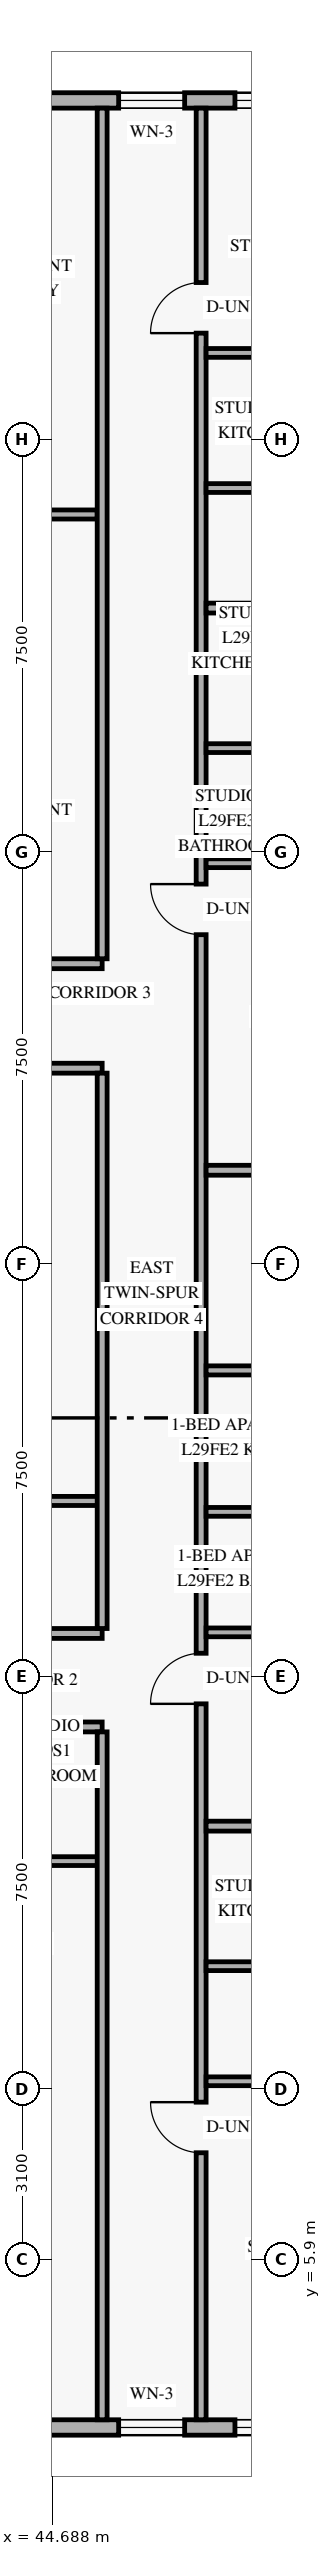
"""IFC4 building model, lengths in metres.
Left out: names, types, materials, properties, quantities, classifications, styles, units other than length and angle.
Written with IfcOpenShell. Run it as: python <this file> out.ifc"""

import sys

from ifc_helpers import new_model, si_unit, direction, frame, frame_2d, origin, place, context, subcontext, project, spatial, rectangle, extrude, element, fill, save


model = new_model("IFC4")
c1 = context("Model", 3, precision=1e-05, world=origin(), true_north=direction((0.0, 1.0)))
c2 = subcontext(c1, "Body", "Model", "MODEL_VIEW")
j1 = project(units=[si_unit("LENGTHUNIT", "METRE"), si_unit("PLANEANGLEUNIT", "RADIAN")], contexts=[c1])
p1 = place(None, origin())
s1 = spatial("IfcSite", under=j1, at=p1, CompositionType="ELEMENT")
p2 = place(p1, origin())
s2 = spatial("IfcBuilding", under=s1, at=p2, CompositionType="ELEMENT")
p3 = place(p2, frame((0.0, 0.0, 113.4)))
s3 = spatial("IfcBuildingStorey", under=s2, at=p3, CompositionType="ELEMENT", Elevation=113.4)
p4 = place(p3, frame((13.42, 2.84, 0.0), z_axis=(0.0, 0.0, 1.0), x_axis=(1.0, 0.0, 0.0)))
e1 = element("IfcWall", 1, at=p4, inside=s3, PredefinedType="SOLIDWALL", context=c2, shape_type="SweptSolid", body=[
    extrude(rectangle(XDim=36.56, YDim=0.28, at=frame_2d((18.28, 0.0))), origin(), (0.0, 0.0, 1.0), 3.35),
])
p5 = place(p4, frame((3.44, 0.0, 0.85)))
e2 = element("IfcOpeningElement", 2, at=p5, cuts=e1, PredefinedType="OPENING", context=c2, shape_type="SweptSolid", body=[
    extrude(rectangle(XDim=1.35, YDim=1.55, at=frame_2d((0.675, 0.775))), frame((0.0, 0.15, 0.0), z_axis=(0.0, -1.0, 0.0), x_axis=(1.0, 0.0, 0.0)), (0.0, 0.0, 1.0), 0.3),
])
p6 = place(p4, frame((10.28, 0.0, 0.85)))
e3 = element("IfcOpeningElement", 3, at=p6, cuts=e1, PredefinedType="OPENING", context=c2, shape_type="SweptSolid", body=[
    extrude(rectangle(XDim=1.35, YDim=1.55, at=frame_2d((0.675, 0.775))), frame((0.0, 0.15, 0.0), z_axis=(0.0, -1.0, 0.0), x_axis=(1.0, 0.0, 0.0)), (0.0, 0.0, 1.0), 0.3),
])
p7 = place(p4, frame((17.165, 0.0, 0.85)))
e4 = element("IfcOpeningElement", 4, at=p7, cuts=e1, PredefinedType="OPENING", context=c2, shape_type="SweptSolid", body=[
    extrude(rectangle(XDim=1.35, YDim=1.55, at=frame_2d((0.675, 0.775))), frame((0.0, 0.15, 0.0), z_axis=(0.0, -1.0, 0.0), x_axis=(1.0, 0.0, 0.0)), (0.0, 0.0, 1.0), 0.3),
])
p8 = place(p4, frame((22.59, 0.0, 0.85)))
e5 = element("IfcOpeningElement", 5, at=p8, cuts=e1, PredefinedType="OPENING", context=c2, shape_type="SweptSolid", body=[
    extrude(rectangle(XDim=1.35, YDim=1.55, at=frame_2d((0.675, 0.775))), frame((0.0, 0.15, 0.0), z_axis=(0.0, -1.0, 0.0), x_axis=(1.0, 0.0, 0.0)), (0.0, 0.0, 1.0), 0.3),
])
p9 = place(p4, frame((27.68, 0.0, 0.85)))
e6 = element("IfcOpeningElement", 6, at=p9, cuts=e1, PredefinedType="OPENING", context=c2, shape_type="SweptSolid", body=[
    extrude(rectangle(XDim=1.35, YDim=1.55, at=frame_2d((0.675, 0.775))), frame((0.0, 0.15, 0.0), z_axis=(0.0, -1.0, 0.0), x_axis=(1.0, 0.0, 0.0)), (0.0, 0.0, 1.0), 0.3),
])
p10 = place(p4, frame((32.48, 0.0, 0.85)))
e7 = element("IfcOpeningElement", 7, at=p10, cuts=e1, PredefinedType="OPENING", context=c2, shape_type="SweptSolid", body=[
    extrude(rectangle(XDim=1.2, YDim=1.5, at=frame_2d((0.6, 0.75))), frame((0.0, 0.15, 0.0), z_axis=(0.0, -1.0, 0.0), x_axis=(1.0, 0.0, 0.0)), (0.0, 0.0, 1.0), 0.3),
])
p11 = place(p4, frame((34.595, 0.0, 0.85)))
e8 = element("IfcOpeningElement", 8, at=p11, cuts=e1, PredefinedType="OPENING", context=c2, shape_type="SweptSolid", body=[
    extrude(rectangle(XDim=1.35, YDim=1.55, at=frame_2d((0.675, 0.775))), frame((0.0, 0.15, 0.0), z_axis=(0.0, -1.0, 0.0), x_axis=(1.0, 0.0, 0.0)), (0.0, 0.0, 1.0), 0.3),
])
p12 = place(p3, frame((49.98, 45.16, 0.0), z_axis=(0.0, 0.0, 1.0), x_axis=(-1.0, 0.0, 0.0)))
e9 = element("IfcWall", 9, at=p12, inside=s3, PredefinedType="SOLIDWALL", context=c2, shape_type="SweptSolid", body=[
    extrude(rectangle(XDim=36.56, YDim=0.28, at=frame_2d((18.28, 0.0))), origin(), (0.0, 0.0, 1.0), 3.35),
])
p13 = place(p12, frame((31.77, 0.0, 0.85)))
e10 = element("IfcOpeningElement", 10, at=p13, cuts=e9, PredefinedType="OPENING", context=c2, shape_type="SweptSolid", body=[
    extrude(rectangle(XDim=1.35, YDim=1.55, at=frame_2d((0.675, 0.775))), frame((0.0, 0.15, 0.0), z_axis=(0.0, -1.0, 0.0), x_axis=(1.0, 0.0, 0.0)), (0.0, 0.0, 1.0), 0.3),
])
p14 = place(p12, frame((23.28, 0.0, 0.85)))
e11 = element("IfcOpeningElement", 11, at=p14, cuts=e9, PredefinedType="OPENING", context=c2, shape_type="SweptSolid", body=[
    extrude(rectangle(XDim=1.35, YDim=1.55, at=frame_2d((0.675, 0.775))), frame((0.0, 0.15, 0.0), z_axis=(0.0, -1.0, 0.0), x_axis=(1.0, 0.0, 0.0)), (0.0, 0.0, 1.0), 0.3),
])
p15 = place(p12, frame((16.395, 0.0, 0.85)))
e12 = element("IfcOpeningElement", 12, at=p15, cuts=e9, PredefinedType="OPENING", context=c2, shape_type="SweptSolid", body=[
    extrude(rectangle(XDim=1.35, YDim=1.55, at=frame_2d((0.675, 0.775))), frame((0.0, 0.15, 0.0), z_axis=(0.0, -1.0, 0.0), x_axis=(1.0, 0.0, 0.0)), (0.0, 0.0, 1.0), 0.3),
])
p16 = place(p12, frame((10.79, 0.0, 0.85)))
e13 = element("IfcOpeningElement", 13, at=p16, cuts=e9, PredefinedType="OPENING", context=c2, shape_type="SweptSolid", body=[
    extrude(rectangle(XDim=1.35, YDim=1.55, at=frame_2d((0.675, 0.775))), frame((0.0, 0.15, 0.0), z_axis=(0.0, -1.0, 0.0), x_axis=(1.0, 0.0, 0.0)), (0.0, 0.0, 1.0), 0.3),
])
p17 = place(p12, frame((5.7, 0.0, 0.85)))
e14 = element("IfcOpeningElement", 14, at=p17, cuts=e9, PredefinedType="OPENING", context=c2, shape_type="SweptSolid", body=[
    extrude(rectangle(XDim=1.35, YDim=1.55, at=frame_2d((0.675, 0.775))), frame((0.0, 0.15, 0.0), z_axis=(0.0, -1.0, 0.0), x_axis=(1.0, 0.0, 0.0)), (0.0, 0.0, 1.0), 0.3),
])
p18 = place(p12, frame((2.88, 0.0, 0.85)))
e15 = element("IfcOpeningElement", 15, at=p18, cuts=e9, PredefinedType="OPENING", context=c2, shape_type="SweptSolid", body=[
    extrude(rectangle(XDim=1.2, YDim=1.5, at=frame_2d((0.6, 0.75))), frame((0.0, 0.15, 0.0), z_axis=(0.0, -1.0, 0.0), x_axis=(1.0, 0.0, 0.0)), (0.0, 0.0, 1.0), 0.3),
])
p19 = place(p12, frame((0.615, 0.0, 0.85)))
e16 = element("IfcOpeningElement", 16, at=p19, cuts=e9, PredefinedType="OPENING", context=c2, shape_type="SweptSolid", body=[
    extrude(rectangle(XDim=1.35, YDim=1.55, at=frame_2d((0.675, 0.775))), frame((0.0, 0.15, 0.0), z_axis=(0.0, -1.0, 0.0), x_axis=(1.0, 0.0, 0.0)), (0.0, 0.0, 1.0), 0.3),
])
p20 = place(p3, frame((38.032, 15.58, 0.0), z_axis=(0.0, 0.0, 1.0), x_axis=(1.0, 0.0, 0.0)))
e17 = element("IfcWall", 17, at=p20, inside=s3, PredefinedType="STANDARD", context=c2, shape_type="SweptSolid", body=[
    extrude(rectangle(XDim=7.568, YDim=0.18, at=frame_2d((3.784, 0.0))), origin(), (0.0, 0.0, 1.0), 2.721),
])
p21 = place(p20, frame((0.357, 0.0, 0.0)))
e18 = element("IfcOpeningElement", 18, at=p21, cuts=e17, PredefinedType="OPENING", context=c2, shape_type="SweptSolid", body=[
    extrude(rectangle(XDim=0.92, YDim=2.15, at=frame_2d((0.46, 1.075))), frame((0.0, 0.1, 0.0), z_axis=(0.0, -1.0, 0.0), x_axis=(1.0, 0.0, 0.0)), (0.0, 0.0, 1.0), 0.2),
])
p22 = place(p3, frame((37.64, 17.28, 0.0), z_axis=(0.0, 0.0, 1.0), x_axis=(1.0, 0.0, 0.0)))
e19 = element("IfcWall", 19, at=p22, inside=s3, PredefinedType="STANDARD", context=c2, shape_type="SweptSolid", body=[
    extrude(rectangle(XDim=7.96, YDim=0.18, at=frame_2d((3.98, 0.0))), origin(), (0.0, 0.0, 1.0), 2.721),
])
p23 = place(p22, frame((1.31, 0.0, 0.0)))
e20 = element("IfcOpeningElement", 20, at=p23, cuts=e19, PredefinedType="OPENING", context=c2, shape_type="SweptSolid", body=[
    extrude(rectangle(XDim=0.95, YDim=2.15, at=frame_2d((0.475, 1.075))), frame((0.0, 0.1, 0.0), z_axis=(0.0, -1.0, 0.0), x_axis=(1.0, 0.0, 0.0)), (0.0, 0.0, 1.0), 0.2),
])
p24 = place(p3, frame((41.18, 27.56, 0.0), z_axis=(0.0, 0.0, 1.0), x_axis=(1.0, 0.0, 0.0)))
e21 = element("IfcWall", 21, at=p24, inside=s3, PredefinedType="STANDARD", context=c2, shape_type="SweptSolid", body=[
    extrude(rectangle(XDim=4.42, YDim=0.18, at=frame_2d((2.21, 0.0))), origin(), (0.0, 0.0, 1.0), 2.721),
])
p25 = place(p24, frame((0.45, 0.0, 0.0)))
e22 = element("IfcOpeningElement", 22, at=p25, cuts=e21, PredefinedType="OPENING", context=c2, shape_type="SweptSolid", body=[
    extrude(rectangle(XDim=0.88, YDim=2.12, at=frame_2d((0.44, 1.06))), frame((0.0, 0.1, 0.0), z_axis=(0.0, -1.0, 0.0), x_axis=(1.0, 0.0, 0.0)), (0.0, 0.0, 1.0), 0.2),
])
p26 = place(p3, frame((35.51, 29.46, 0.0), z_axis=(0.0, 0.0, 1.0), x_axis=(1.0, 0.0, 0.0)))
e23 = element("IfcWall", 23, at=p26, inside=s3, PredefinedType="STANDARD", context=c2, shape_type="SweptSolid", body=[
    extrude(rectangle(XDim=10.09, YDim=0.18, at=frame_2d((5.045, 0.0))), origin(), (0.0, 0.0, 1.0), 2.721),
])
p27 = place(p26, frame((0.32, 0.0, 0.0)))
e24 = element("IfcOpeningElement", 24, at=p27, cuts=e23, PredefinedType="OPENING", context=c2, shape_type="SweptSolid", body=[
    extrude(rectangle(XDim=0.92, YDim=2.15, at=frame_2d((0.46, 1.075))), frame((0.0, 0.1, 0.0), z_axis=(0.0, -1.0, 0.0), x_axis=(1.0, 0.0, 0.0)), (0.0, 0.0, 1.0), 0.2),
])
p28 = place(p3, frame((40.93, 13.14, 0.0), z_axis=(0.0, 0.0, 1.0), x_axis=(1.0, 0.0, 0.0)))
e25 = element("IfcWall", 25, at=p28, inside=s3, PredefinedType="PLUMBINGWALL", context=c2, shape_type="SweptSolid", body=[
    extrude(rectangle(XDim=4.67, YDim=0.16, at=frame_2d((2.335, 0.0))), origin(), (0.0, 0.0, 1.0), 2.721),
])
p29 = place(p28, frame((0.35, 0.0, 0.0)))
e26 = element("IfcOpeningElement", 26, at=p29, cuts=e25, PredefinedType="OPENING", context=c2, shape_type="SweptSolid", body=[
    extrude(rectangle(XDim=0.88, YDim=2.12, at=frame_2d((0.44, 1.06))), frame((0.0, 0.09, 0.0), z_axis=(0.0, -1.0, 0.0), x_axis=(1.0, 0.0, 0.0)), (0.0, 0.0, 1.0), 0.18),
])
p30 = place(p28, frame((2.72, 0.0, 0.0)))
e27 = element("IfcOpeningElement", 27, at=p30, cuts=e25, PredefinedType="OPENING", context=c2, shape_type="SweptSolid", body=[
    extrude(rectangle(XDim=0.86, YDim=2.12, at=frame_2d((0.43, 1.06))), frame((0.0, 0.09, 0.0), z_axis=(0.0, -1.0, 0.0), x_axis=(1.0, 0.0, 0.0)), (0.0, 0.0, 1.0), 0.18),
])
p31 = place(p3, frame((41.69, 37.63, 0.0), z_axis=(0.0, 0.0, 1.0), x_axis=(1.0, 0.0, 0.0)))
e28 = element("IfcWall", 28, at=p31, inside=s3, PredefinedType="PARTITIONING", context=c2, shape_type="SweptSolid", body=[
    extrude(rectangle(XDim=3.82, YDim=0.165, at=frame_2d((1.91, 0.0))), origin(), (0.0, 0.0, 1.0), 2.721),
])
p32 = place(p3, frame((41.18, 19.69, 0.0), z_axis=(0.0, 0.0, 1.0), x_axis=(1.0, 0.0, 0.0)))
e29 = element("IfcWall", 29, at=p32, inside=s3, PredefinedType="PARTITIONING", context=c2, shape_type="SweptSolid", body=[
    extrude(rectangle(XDim=4.42, YDim=0.165, at=frame_2d((2.21, 0.0))), origin(), (0.0, 0.0, 1.0), 2.721),
])
p33 = place(p3, frame((47.4, 2.98, 0.0), z_axis=(0.0, 0.0, 1.0), x_axis=(0.0, 1.0, 0.0)))
e30 = element("IfcWall", 30, at=p33, inside=s3, PredefinedType="STANDARD", context=c2, shape_type="SweptSolid", body=[
    extrude(rectangle(XDim=42.04, YDim=0.18, at=frame_2d((21.02, 0.0))), origin(), (0.0, 0.0, 1.0), 2.721),
])
p34 = place(p33, frame((4.856, 0.0, 0.0)))
e31 = element("IfcOpeningElement", 31, at=p34, cuts=e30, PredefinedType="OPENING", context=c2, shape_type="SweptSolid", body=[
    extrude(rectangle(XDim=0.92, YDim=2.15, at=frame_2d((0.46, 1.075))), frame((0.0, 0.1, 0.0), z_axis=(0.0, -1.0, 0.0), x_axis=(1.0, 0.0, 0.0)), (0.0, 0.0, 1.0), 0.2),
])
p35 = place(p33, frame((13.02, 0.0, 0.0)))
e32 = element("IfcOpeningElement", 32, at=p35, cuts=e30, PredefinedType="OPENING", context=c2, shape_type="SweptSolid", body=[
    extrude(rectangle(XDim=0.92, YDim=2.15, at=frame_2d((0.46, 1.075))), frame((0.0, 0.1, 0.0), z_axis=(0.0, -1.0, 0.0), x_axis=(1.0, 0.0, 0.0)), (0.0, 0.0, 1.0), 0.2),
])
p36 = place(p33, frame((27.008, 0.0, 0.0)))
e33 = element("IfcOpeningElement", 33, at=p36, cuts=e30, PredefinedType="OPENING", context=c2, shape_type="SweptSolid", body=[
    extrude(rectangle(XDim=0.92, YDim=2.15, at=frame_2d((0.46, 1.075))), frame((0.0, 0.1, 0.0), z_axis=(0.0, -1.0, 0.0), x_axis=(1.0, 0.0, 0.0)), (0.0, 0.0, 1.0), 0.2),
])
p37 = place(p33, frame((37.948, 0.0, 0.0)))
e34 = element("IfcOpeningElement", 34, at=p37, cuts=e30, PredefinedType="OPENING", context=c2, shape_type="SweptSolid", body=[
    extrude(rectangle(XDim=0.92, YDim=2.15, at=frame_2d((0.46, 1.075))), frame((0.0, 0.1, 0.0), z_axis=(0.0, -1.0, 0.0), x_axis=(1.0, 0.0, 0.0)), (0.0, 0.0, 1.0), 0.2),
])
p38 = place(p3, frame((45.6, 2.98, 0.0), z_axis=(0.0, 0.0, 1.0), x_axis=(0.0, 1.0, 0.0)))
e35 = element("IfcWall", 35, at=p38, inside=s3, PredefinedType="STANDARD", context=c2, shape_type="SweptSolid", body=[
    extrude(rectangle(XDim=12.51, YDim=0.18, at=frame_2d((6.255, 0.0))), origin(), (0.0, 0.0, 1.0), 2.721),
])
p39 = place(p3, frame((45.6, 17.37, 0.0), z_axis=(0.0, 0.0, 1.0), x_axis=(0.0, 1.0, 0.0)))
e36 = element("IfcWall", 36, at=p39, inside=s3, PredefinedType="STANDARD", context=c2, shape_type="SweptSolid", body=[
    extrude(rectangle(XDim=10.1, YDim=0.18, at=frame_2d((5.05, 0.0))), origin(), (0.0, 0.0, 1.0), 2.721),
])
p40 = place(p3, frame((45.6, 29.55, 0.0), z_axis=(0.0, 0.0, 1.0), x_axis=(0.0, 1.0, 0.0)))
e37 = element("IfcWall", 37, at=p40, inside=s3, PredefinedType="STANDARD", context=c2, shape_type="SweptSolid", body=[
    extrude(rectangle(XDim=15.47, YDim=0.18, at=frame_2d((7.735, 0.0))), origin(), (0.0, 0.0, 1.0), 2.721),
])
p41 = place(p3, frame((47.49, 9.136, 0.0), z_axis=(0.0, 0.0, 1.0), x_axis=(1.0, 0.0, 0.0)))
e38 = element("IfcWall", 38, at=p41, inside=s3, PredefinedType="PLUMBINGWALL", context=c2, shape_type="SweptSolid", body=[
    extrude(rectangle(XDim=3.775, YDim=0.16, at=frame_2d((1.888, 0.0))), origin(), (0.0, 0.0, 1.0), 2.721),
])
p42 = place(p3, frame((47.49, 11.229, 0.0), z_axis=(0.0, 0.0, 1.0), x_axis=(1.0, 0.0, 0.0)))
e39 = element("IfcWall", 39, at=p42, inside=s3, PredefinedType="PLUMBINGWALL", context=c2, shape_type="SweptSolid", body=[
    extrude(rectangle(XDim=3.615, YDim=0.16, at=frame_2d((1.808, 0.0))), origin(), (0.0, 0.0, 1.0), 2.799),
])
p43 = place(p3, frame((47.49, 13.776, 0.0), z_axis=(0.0, 0.0, 1.0), x_axis=(1.0, 0.0, 0.0)))
e40 = element("IfcWall", 40, at=p43, inside=s3, PredefinedType="PARTITIONING", context=c2, shape_type="SweptSolid", body=[
    extrude(rectangle(XDim=5.83, YDim=0.18, at=frame_2d((2.915, 0.0))), origin(), (0.0, 0.0, 1.0), 2.799),
])
p44 = place(p3, frame((47.49, 22.064, 0.0), z_axis=(0.0, 0.0, 1.0), x_axis=(1.0, 0.0, 0.0)))
e41 = element("IfcWall", 41, at=p44, inside=s3, PredefinedType="PARTITIONING", context=c2, shape_type="SweptSolid", body=[
    extrude(rectangle(XDim=5.83, YDim=0.165, at=frame_2d((2.915, 0.0))), origin(), (0.0, 0.0, 1.0), 2.799),
])
p45 = place(p44, frame((4.468, 0.0, 0.0)))
e42 = element("IfcOpeningElement", 42, at=p45, cuts=e41, PredefinedType="OPENING", context=c2, shape_type="SweptSolid", body=[
    extrude(rectangle(XDim=0.9, YDim=2.14, at=frame_2d((0.45, 1.07))), frame((0.0, 0.093, 0.0), z_axis=(0.0, -1.0, 0.0), x_axis=(1.0, 0.0, 0.0)), (0.0, 0.0, 1.0), 0.185),
])
p46 = place(p3, frame((47.49, 17.3, 0.0), z_axis=(0.0, 0.0, 1.0), x_axis=(1.0, 0.0, 0.0)))
e43 = element("IfcWall", 43, at=p46, inside=s3, PredefinedType="PLUMBINGWALL", context=c2, shape_type="SweptSolid", body=[
    extrude(rectangle(XDim=3.775, YDim=0.16, at=frame_2d((1.888, 0.0))), origin(), (0.0, 0.0, 1.0), 2.721),
])
p47 = place(p3, frame((47.49, 19.491, 0.0), z_axis=(0.0, 0.0, 1.0), x_axis=(1.0, 0.0, 0.0)))
e44 = element("IfcWall", 44, at=p47, inside=s3, PredefinedType="PLUMBINGWALL", context=c2, shape_type="SweptSolid", body=[
    extrude(rectangle(XDim=3.615, YDim=0.16, at=frame_2d((1.808, 0.0))), origin(), (0.0, 0.0, 1.0), 2.799),
])
p48 = place(p3, frame((47.49, 25.704, 0.0), z_axis=(0.0, 0.0, 1.0), x_axis=(1.0, 0.0, 0.0)))
e45 = element("IfcWall", 45, at=p48, inside=s3, PredefinedType="PARTITIONING", context=c2, shape_type="SweptSolid", body=[
    extrude(rectangle(XDim=5.83, YDim=0.18, at=frame_2d((2.915, 0.0))), origin(), (0.0, 0.0, 1.0), 2.799),
])
p49 = place(p3, frame((47.49, 31.288, 0.0), z_axis=(0.0, 0.0, 1.0), x_axis=(1.0, 0.0, 0.0)))
e46 = element("IfcWall", 46, at=p49, inside=s3, PredefinedType="PLUMBINGWALL", context=c2, shape_type="SweptSolid", body=[
    extrude(rectangle(XDim=2.53, YDim=0.16, at=frame_2d((1.265, 0.0))), origin(), (0.0, 0.0, 1.0), 2.799),
])
p50 = place(p3, frame((47.49, 33.381, 0.0), z_axis=(0.0, 0.0, 1.0), x_axis=(1.0, 0.0, 0.0)))
e47 = element("IfcWall", 47, at=p50, inside=s3, PredefinedType="PLUMBINGWALL", context=c2, shape_type="SweptSolid", body=[
    extrude(rectangle(XDim=2.37, YDim=0.16, at=frame_2d((1.185, 0.0))), origin(), (0.0, 0.0, 1.0), 2.799),
])
p51 = place(p3, frame((47.49, 35.928, 0.0), z_axis=(0.0, 0.0, 1.0), x_axis=(1.0, 0.0, 0.0)))
e48 = element("IfcWall", 48, at=p51, inside=s3, PredefinedType="PARTITIONING", context=c2, shape_type="SweptSolid", body=[
    extrude(rectangle(XDim=5.83, YDim=0.18, at=frame_2d((2.915, 0.0))), origin(), (0.0, 0.0, 1.0), 2.799),
])
p52 = place(p3, frame((47.49, 40.568, 0.0), z_axis=(0.0, 0.0, 1.0), x_axis=(1.0, 0.0, 0.0)))
e49 = element("IfcWall", 49, at=p52, inside=s3, PredefinedType="PLUMBINGWALL", context=c2, shape_type="SweptSolid", body=[
    extrude(rectangle(XDim=3.775, YDim=0.16, at=frame_2d((1.888, 0.0))), origin(), (0.0, 0.0, 1.0), 2.799),
])
p53 = place(p3, frame((47.49, 38.111, 0.0), z_axis=(0.0, 0.0, 1.0), x_axis=(1.0, 0.0, 0.0)))
e50 = element("IfcWall", 50, at=p53, inside=s3, PredefinedType="PLUMBINGWALL", context=c2, shape_type="SweptSolid", body=[
    extrude(rectangle(XDim=3.615, YDim=0.16, at=frame_2d((1.808, 0.0))), origin(), (0.0, 0.0, 1.0), 2.799),
])
p54 = place(p10, origin())
e51 = element("IfcWindow", 51, at=p54, inside=s3, PartitioningType="SINGLE_PANEL", PredefinedType="WINDOW", context=c2, shape_type="SweptSolid", body=[
    extrude(rectangle(XDim=1.2, YDim=1.5, at=frame_2d((0.6, 0.75))), frame((0.0, 0.03, 0.0), z_axis=(0.0, -1.0, 0.0), x_axis=(1.0, 0.0, 0.0)), (0.0, 0.0, 1.0), 0.06),
])
fill(e7, e51)
p55 = place(p11, origin())
e52 = element("IfcWindow", 52, at=p55, inside=s3, PartitioningType="SINGLE_PANEL", PredefinedType="WINDOW", context=c2, shape_type="SweptSolid", body=[
    extrude(rectangle(XDim=1.35, YDim=1.55, at=frame_2d((0.675, 0.775))), frame((0.0, 0.03, 0.0), z_axis=(0.0, -1.0, 0.0), x_axis=(1.0, 0.0, 0.0)), (0.0, 0.0, 1.0), 0.06),
])
fill(e8, e52)
p56 = place(p18, origin())
e53 = element("IfcWindow", 53, at=p56, inside=s3, PartitioningType="SINGLE_PANEL", PredefinedType="WINDOW", context=c2, shape_type="SweptSolid", body=[
    extrude(rectangle(XDim=1.2, YDim=1.5, at=frame_2d((0.6, 0.75))), frame((0.0, 0.03, 0.0), z_axis=(0.0, -1.0, 0.0), x_axis=(1.0, 0.0, 0.0)), (0.0, 0.0, 1.0), 0.06),
])
fill(e15, e53)
p57 = place(p19, origin())
e54 = element("IfcWindow", 54, at=p57, inside=s3, PartitioningType="SINGLE_PANEL", PredefinedType="WINDOW", context=c2, shape_type="SweptSolid", body=[
    extrude(rectangle(XDim=1.35, YDim=1.55, at=frame_2d((0.675, 0.775))), frame((0.0, 0.03, 0.0), z_axis=(0.0, -1.0, 0.0), x_axis=(1.0, 0.0, 0.0)), (0.0, 0.0, 1.0), 0.06),
])
fill(e16, e54)
p58 = place(p34, origin())
e55 = element("IfcDoor", 55, at=p58, inside=s3, OperationType="SINGLE_SWING_RIGHT", PredefinedType="DOOR", context=c2, shape_type="SweptSolid", body=[
    extrude(rectangle(XDim=0.92, YDim=2.15, at=frame_2d((0.46, 1.075))), frame((0.0, 0.025, 0.0), z_axis=(0.0, -1.0, 0.0), x_axis=(1.0, 0.0, 0.0)), (0.0, 0.0, 1.0), 0.05),
])
fill(e31, e55)
p59 = place(p35, origin())
e56 = element("IfcDoor", 56, at=p59, inside=s3, OperationType="SINGLE_SWING_LEFT", PredefinedType="DOOR", context=c2, shape_type="SweptSolid", body=[
    extrude(rectangle(XDim=0.92, YDim=2.15, at=frame_2d((0.46, 1.075))), frame((0.0, 0.025, 0.0), z_axis=(0.0, -1.0, 0.0), x_axis=(1.0, 0.0, 0.0)), (0.0, 0.0, 1.0), 0.05),
])
fill(e32, e56)
p60 = place(p36, origin())
e57 = element("IfcDoor", 57, at=p60, inside=s3, OperationType="SINGLE_SWING_RIGHT", PredefinedType="DOOR", context=c2, shape_type="SweptSolid", body=[
    extrude(rectangle(XDim=0.92, YDim=2.15, at=frame_2d((0.46, 1.075))), frame((0.0, 0.025, 0.0), z_axis=(0.0, -1.0, 0.0), x_axis=(1.0, 0.0, 0.0)), (0.0, 0.0, 1.0), 0.05),
])
fill(e33, e57)
p61 = place(p37, origin())
e58 = element("IfcDoor", 58, at=p61, inside=s3, OperationType="SINGLE_SWING_LEFT", PredefinedType="DOOR", context=c2, shape_type="SweptSolid", body=[
    extrude(rectangle(XDim=0.92, YDim=2.15, at=frame_2d((0.46, 1.075))), frame((0.0, 0.025, 0.0), z_axis=(0.0, -1.0, 0.0), x_axis=(1.0, 0.0, 0.0)), (0.0, 0.0, 1.0), 0.05),
])
fill(e34, e58)
save(model, sys.argv[1])
